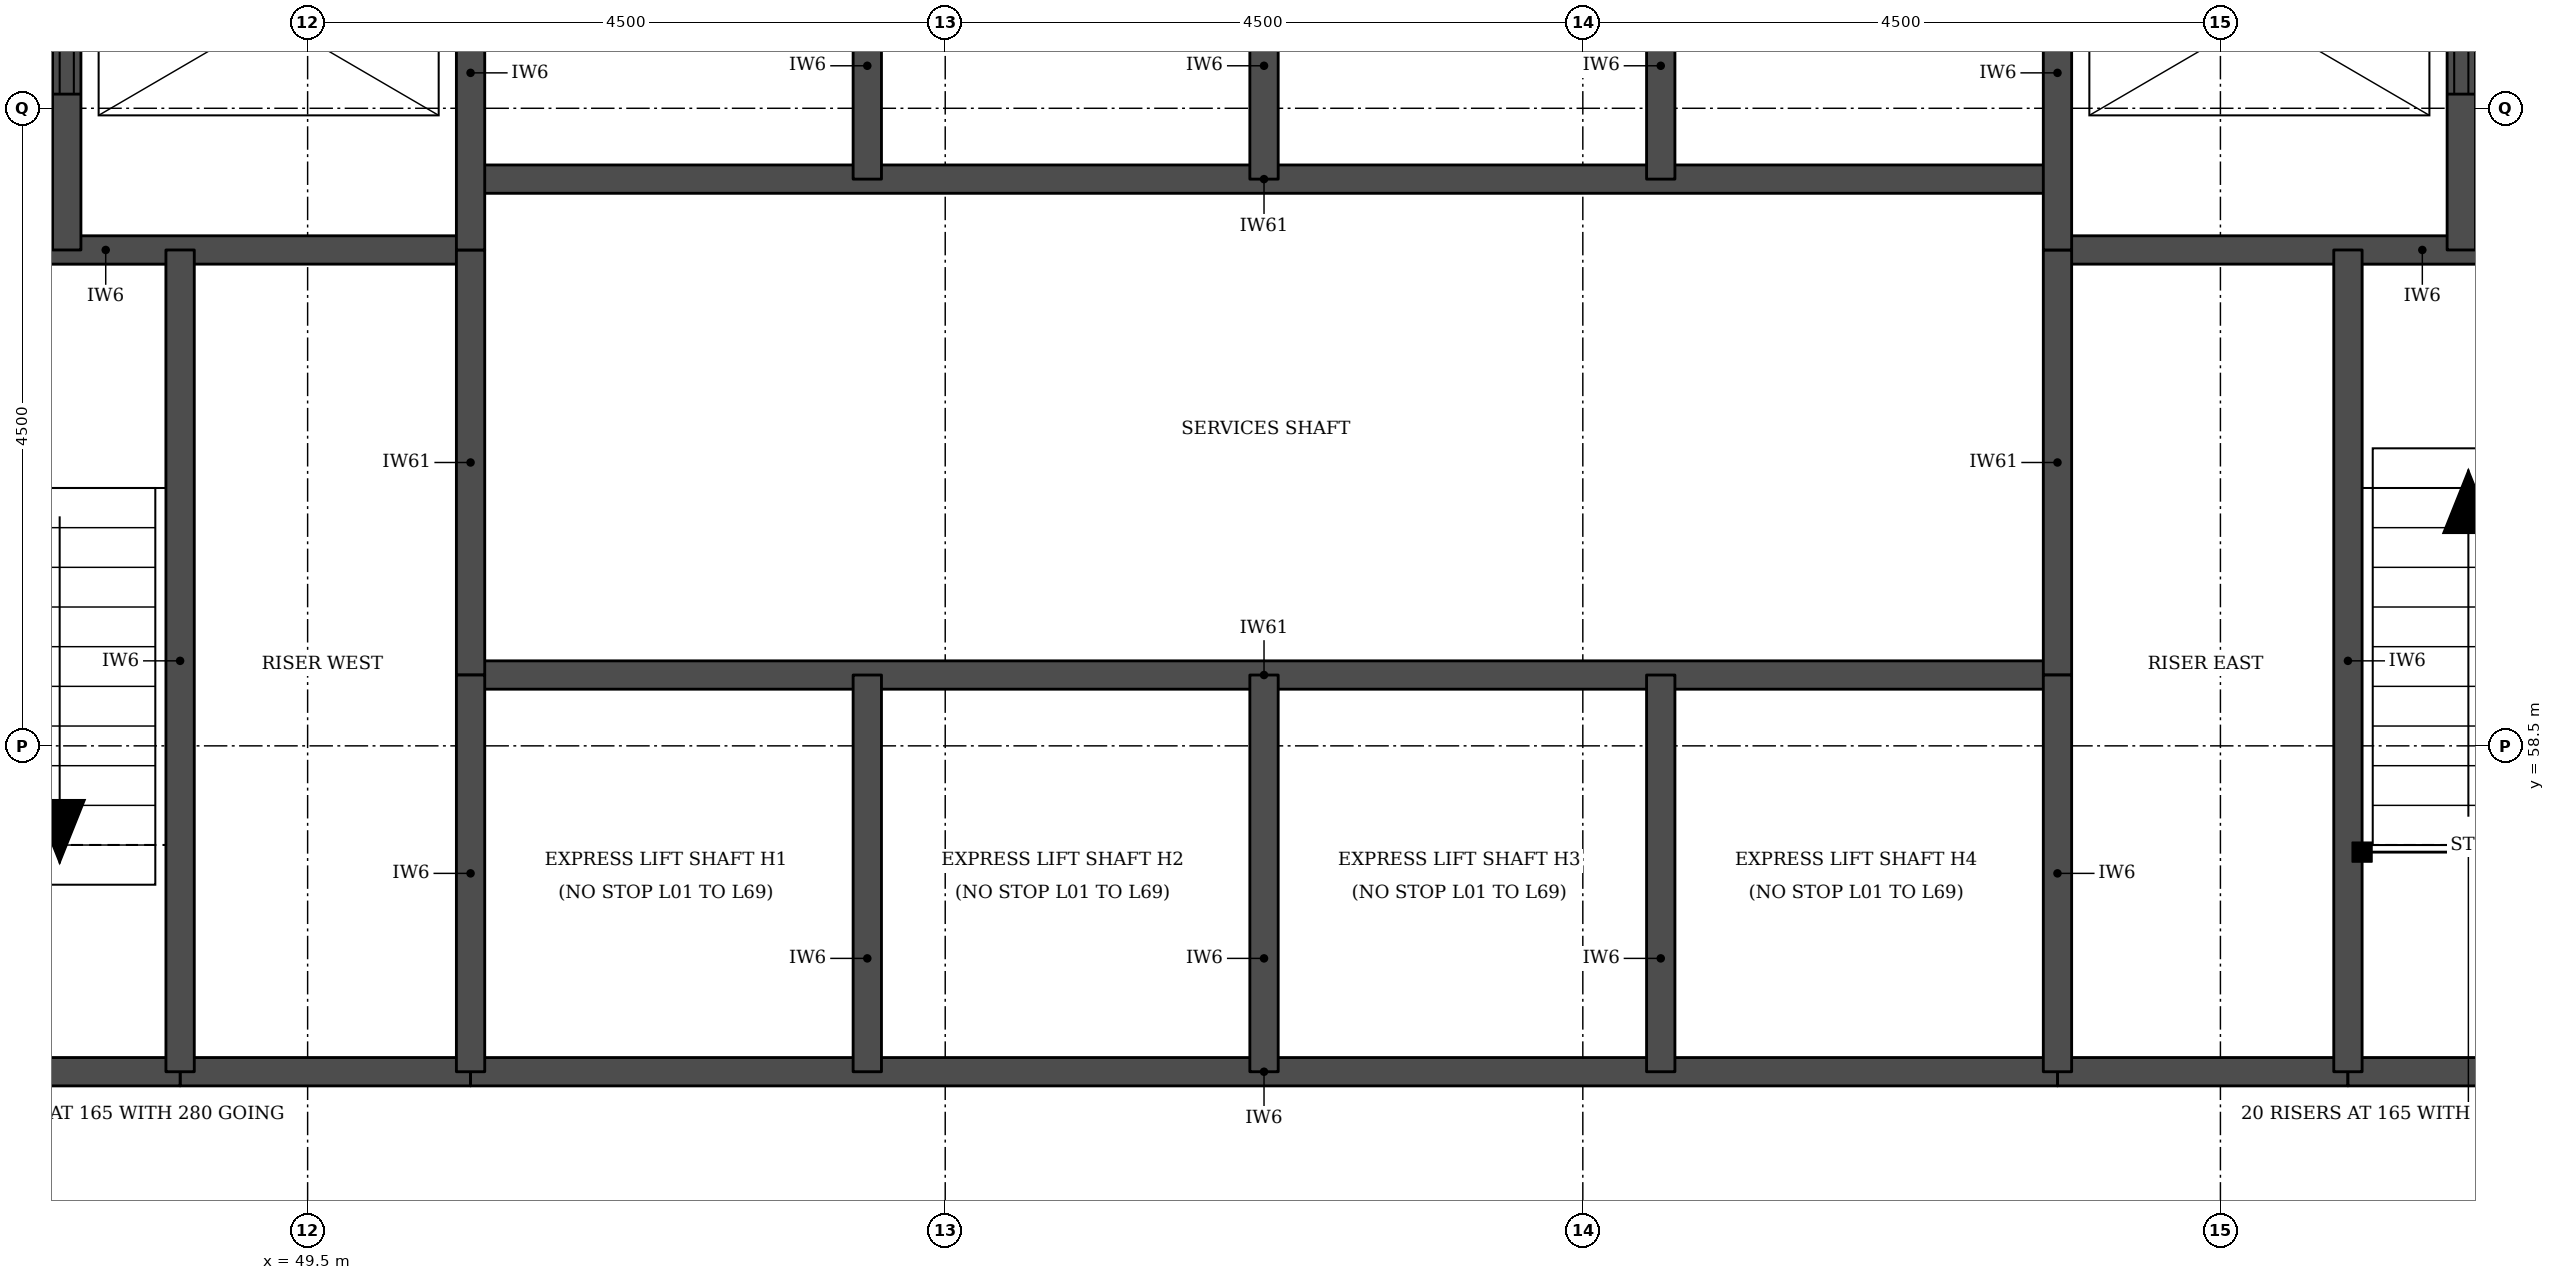
"""IFC4 building model, lengths in metres.
Left out: names, types, materials, properties, quantities, classifications, styles, units other than length and angle.
Written with IfcOpenShell. Run it as: python <this file> out.ifc"""

import sys

from ifc_helpers import new_model, si_unit, direction, frame, frame_2d, origin, place, context, subcontext, project, spatial, rectangle, extrude, element, fill, save


model = new_model("IFC4")
c1 = context("Model", 3, precision=1e-05, world=origin(), true_north=direction((0.0, 1.0)))
c2 = subcontext(c1, "Body", "Model", "MODEL_VIEW")
j1 = project(units=[si_unit("LENGTHUNIT", "METRE"), si_unit("PLANEANGLEUNIT", "RADIAN")], contexts=[c1])
p1 = place(None, origin())
s1 = spatial("IfcSite", under=j1, at=p1, CompositionType="ELEMENT")
p2 = place(p1, origin())
s2 = spatial("IfcBuilding", under=s1, at=p2, CompositionType="ELEMENT")
p3 = place(p2, frame((0.0, 0.0, 36.3)))
s3 = spatial("IfcBuildingStorey", under=s2, at=p3, CompositionType="ELEMENT", Elevation=36.3)
for number, where, z_axis, x_axis in (
    (1, (48.6, 56.2, 0.0), (0.0, 0.0, 1.0), (1.0, 0.0, 0.0)),
    (2, (61.85, 56.2, 0.0), (0.0, 0.0, 1.0), (1.0, 0.0, 0.0)),
):
    element("IfcWall", number, at=place(p3, frame(where, z_axis=z_axis, x_axis=x_axis)), inside=s3, PredefinedType="SOLIDWALL", context=c2, shape_type="SweptSolid", body=[
        extrude(rectangle(XDim=2.05, YDim=0.2, at=frame_2d((1.025, 0.0))), origin(), (0.0, 0.0, 1.0), 3.08),
    ])
p4 = place(p3, frame((45.5, 56.2, 0.0), z_axis=(0.0, 0.0, 1.0), x_axis=(1.0, 0.0, 0.0)))
e3 = element("IfcWall", 3, at=p4, inside=s3, PredefinedType="SOLIDWALL", context=c2, shape_type="SweptSolid", body=[
    extrude(rectangle(XDim=3.1, YDim=0.2, at=frame_2d((1.55, 0.0))), origin(), (0.0, 0.0, 1.0), 3.08),
])
p5 = place(p3, frame((50.65, 56.2, 0.0), z_axis=(0.0, 0.0, 1.0), x_axis=(1.0, 0.0, 0.0)))
e4 = element("IfcWall", 4, at=p5, inside=s3, PredefinedType="SOLIDWALL", context=c2, shape_type="SweptSolid", body=[
    extrude(rectangle(XDim=11.2, YDim=0.2, at=frame_2d((5.6, 0.0))), origin(), (0.0, 0.0, 1.0), 3.08),
])
p6 = place(p3, frame((63.9, 56.2, 0.0), z_axis=(0.0, 0.0, 1.0), x_axis=(1.0, 0.0, 0.0)))
e5 = element("IfcWall", 5, at=p6, inside=s3, PredefinedType="SOLIDWALL", context=c2, shape_type="SweptSolid", body=[
    extrude(rectangle(XDim=3.1, YDim=0.2, at=frame_2d((1.55, 0.0))), origin(), (0.0, 0.0, 1.0), 3.08),
])
p7 = place(p3, frame((50.65, 59.0, 0.0), z_axis=(0.0, 0.0, 1.0), x_axis=(1.0, 0.0, 0.0)))
e6 = element("IfcWall", 6, at=p7, inside=s3, PredefinedType="SOLIDWALL", context=c2, shape_type="SweptSolid", body=[
    extrude(rectangle(XDim=11.2, YDim=0.2, at=frame_2d((5.6, 0.0))), origin(), (0.0, 0.0, 1.0), 3.3),
])
for number, where, z_axis, x_axis in (
    (7, (45.5, 62.0, 0.0), (0.0, 0.0, 1.0), (1.0, 0.0, 0.0)),
    (8, (61.85, 62.0, 0.0), (0.0, 0.0, 1.0), (1.0, 0.0, 0.0)),
):
    element("IfcWall", number, at=place(p3, frame(where, z_axis=z_axis, x_axis=x_axis)), inside=s3, PredefinedType="SOLIDWALL", context=c2, shape_type="SweptSolid", body=[
        extrude(rectangle(XDim=5.15, YDim=0.2, at=frame_2d((2.575, 0.0))), origin(), (0.0, 0.0, 1.0), 3.08),
    ])
p8 = place(p3, frame((50.65, 62.5, 0.0), z_axis=(0.0, 0.0, 1.0), x_axis=(1.0, 0.0, 0.0)))
e9 = element("IfcWall", 9, at=p8, inside=s3, PredefinedType="SOLIDWALL", context=c2, shape_type="SweptSolid", body=[
    extrude(rectangle(XDim=11.2, YDim=0.2, at=frame_2d((5.6, 0.0))), origin(), (0.0, 0.0, 1.0), 3.3),
])
p9 = place(p3, frame((47.8, 62.0, 0.0), z_axis=(0.0, 0.0, 1.0), x_axis=(0.0, 1.0, 0.0)))
e10 = element("IfcWall", 10, at=p9, inside=s3, PredefinedType="SOLIDWALL", context=c2, shape_type="SweptSolid", body=[
    extrude(rectangle(XDim=3.3, YDim=0.2, at=frame_2d((1.65, 0.0))), origin(), (0.0, 0.0, 1.0), 3.08),
])
p10 = place(p9, frame((1.1, 0.0, 0.0)))
e11 = element("IfcOpeningElement", 11, at=p10, cuts=e10, PredefinedType="OPENING", context=c2, shape_type="SweptSolid", body=[
    extrude(rectangle(XDim=1.1, YDim=2.1, at=frame_2d((0.55, 1.05))), frame((0.0, 0.11, 0.0), z_axis=(0.0, -1.0, 0.0), x_axis=(1.0, 0.0, 0.0)), (0.0, 0.0, 1.0), 0.22),
])
p11 = place(p3, frame((48.6, 56.2, 0.0), z_axis=(0.0, 0.0, 1.0), x_axis=(0.0, 1.0, 0.0)))
e12 = element("IfcWall", 12, at=p11, inside=s3, PredefinedType="SOLIDWALL", context=c2, shape_type="SweptSolid", body=[
    extrude(rectangle(XDim=5.8, YDim=0.2, at=frame_2d((2.9, 0.0))), origin(), (0.0, 0.0, 1.0), 3.08),
])
p12 = place(p3, frame((50.65, 59.0, 0.0), z_axis=(0.0, 0.0, 1.0), x_axis=(0.0, 1.0, 0.0)))
e13 = element("IfcWall", 13, at=p12, inside=s3, PredefinedType="SOLIDWALL", context=c2, shape_type="SweptSolid", body=[
    extrude(rectangle(XDim=3.0, YDim=0.2, at=frame_2d((1.5, 0.0))), origin(), (0.0, 0.0, 1.0), 3.3),
])
p13 = place(p3, frame((50.65, 56.2, 0.0), z_axis=(0.0, 0.0, 1.0), x_axis=(0.0, 1.0, 0.0)))
e14 = element("IfcWall", 14, at=p13, inside=s3, PredefinedType="SOLIDWALL", context=c2, shape_type="SweptSolid", body=[
    extrude(rectangle(XDim=2.8, YDim=0.2, at=frame_2d((1.4, 0.0))), origin(), (0.0, 0.0, 1.0), 3.08),
])
p14 = place(p3, frame((50.65, 62.0, 0.0), z_axis=(0.0, 0.0, 1.0), x_axis=(0.0, 1.0, 0.0)))
e15 = element("IfcWall", 15, at=p14, inside=s3, PredefinedType="SOLIDWALL", context=c2, shape_type="SweptSolid", body=[
    extrude(rectangle(XDim=3.3, YDim=0.2, at=frame_2d((1.65, 0.0))), origin(), (0.0, 0.0, 1.0), 3.08),
])
for number, where, z_axis, x_axis in (
    (16, (53.45, 56.2, 0.0), (0.0, 0.0, 1.0), (0.0, 1.0, 0.0)),
    (17, (53.45, 62.5, 0.0), (0.0, 0.0, 1.0), (0.0, 1.0, 0.0)),
    (18, (56.25, 56.2, 0.0), (0.0, 0.0, 1.0), (0.0, 1.0, 0.0)),
    (19, (56.25, 62.5, 0.0), (0.0, 0.0, 1.0), (0.0, 1.0, 0.0)),
    (20, (59.05, 56.2, 0.0), (0.0, 0.0, 1.0), (0.0, 1.0, 0.0)),
    (21, (59.05, 62.5, 0.0), (0.0, 0.0, 1.0), (0.0, 1.0, 0.0)),
):
    element("IfcWall", number, at=place(p3, frame(where, z_axis=z_axis, x_axis=x_axis)), inside=s3, PredefinedType="SOLIDWALL", context=c2, shape_type="SweptSolid", body=[
        extrude(rectangle(XDim=2.8, YDim=0.2, at=frame_2d((1.4, 0.0))), origin(), (0.0, 0.0, 1.0), 3.08),
    ])
p15 = place(p3, frame((61.85, 59.0, 0.0), z_axis=(0.0, 0.0, 1.0), x_axis=(0.0, 1.0, 0.0)))
e22 = element("IfcWall", 22, at=p15, inside=s3, PredefinedType="SOLIDWALL", context=c2, shape_type="SweptSolid", body=[
    extrude(rectangle(XDim=3.0, YDim=0.2, at=frame_2d((1.5, 0.0))), origin(), (0.0, 0.0, 1.0), 3.3),
])
p16 = place(p3, frame((61.85, 56.2, 0.0), z_axis=(0.0, 0.0, 1.0), x_axis=(0.0, 1.0, 0.0)))
e23 = element("IfcWall", 23, at=p16, inside=s3, PredefinedType="SOLIDWALL", context=c2, shape_type="SweptSolid", body=[
    extrude(rectangle(XDim=2.8, YDim=0.2, at=frame_2d((1.4, 0.0))), origin(), (0.0, 0.0, 1.0), 3.08),
])
p17 = place(p3, frame((61.85, 62.0, 0.0), z_axis=(0.0, 0.0, 1.0), x_axis=(0.0, 1.0, 0.0)))
e24 = element("IfcWall", 24, at=p17, inside=s3, PredefinedType="SOLIDWALL", context=c2, shape_type="SweptSolid", body=[
    extrude(rectangle(XDim=3.3, YDim=0.2, at=frame_2d((1.65, 0.0))), origin(), (0.0, 0.0, 1.0), 3.08),
])
p18 = place(p3, frame((63.9, 56.2, 0.0), z_axis=(0.0, 0.0, 1.0), x_axis=(0.0, 1.0, 0.0)))
e25 = element("IfcWall", 25, at=p18, inside=s3, PredefinedType="SOLIDWALL", context=c2, shape_type="SweptSolid", body=[
    extrude(rectangle(XDim=5.8, YDim=0.2, at=frame_2d((2.9, 0.0))), origin(), (0.0, 0.0, 1.0), 3.08),
])
p19 = place(p3, frame((64.7, 62.0, 0.0), z_axis=(0.0, 0.0, 1.0), x_axis=(0.0, 1.0, 0.0)))
e26 = element("IfcWall", 26, at=p19, inside=s3, PredefinedType="SOLIDWALL", context=c2, shape_type="SweptSolid", body=[
    extrude(rectangle(XDim=3.3, YDim=0.2, at=frame_2d((1.65, 0.0))), origin(), (0.0, 0.0, 1.0), 3.08),
])
p20 = place(p19, frame((1.1, 0.0, 0.0)))
e27 = element("IfcOpeningElement", 27, at=p20, cuts=e26, PredefinedType="OPENING", context=c2, shape_type="SweptSolid", body=[
    extrude(rectangle(XDim=1.1, YDim=2.1, at=frame_2d((0.55, 1.05))), frame((0.0, 0.11, 0.0), z_axis=(0.0, -1.0, 0.0), x_axis=(1.0, 0.0, 0.0)), (0.0, 0.0, 1.0), 0.22),
])
p21 = place(p10, origin())
e28 = element("IfcDoor", 28, at=p21, inside=s3, OperationType="DOUBLE_DOOR_SLIDING", PredefinedType="DOOR", context=c2, shape_type="SweptSolid", body=[
    extrude(rectangle(XDim=1.1, YDim=2.1, at=frame_2d((0.55, 1.05))), frame((0.0, 0.025, 0.0), z_axis=(0.0, -1.0, 0.0), x_axis=(1.0, 0.0, 0.0)), (0.0, 0.0, 1.0), 0.05),
])
fill(e11, e28)
p22 = place(p20, origin())
e29 = element("IfcDoor", 29, at=p22, inside=s3, OperationType="DOUBLE_DOOR_SLIDING", PredefinedType="DOOR", context=c2, shape_type="SweptSolid", body=[
    extrude(rectangle(XDim=1.1, YDim=2.1, at=frame_2d((0.55, 1.05))), frame((0.0, 0.025, 0.0), z_axis=(0.0, -1.0, 0.0), x_axis=(1.0, 0.0, 0.0)), (0.0, 0.0, 1.0), 0.05),
])
fill(e27, e29)
save(model, sys.argv[1])
